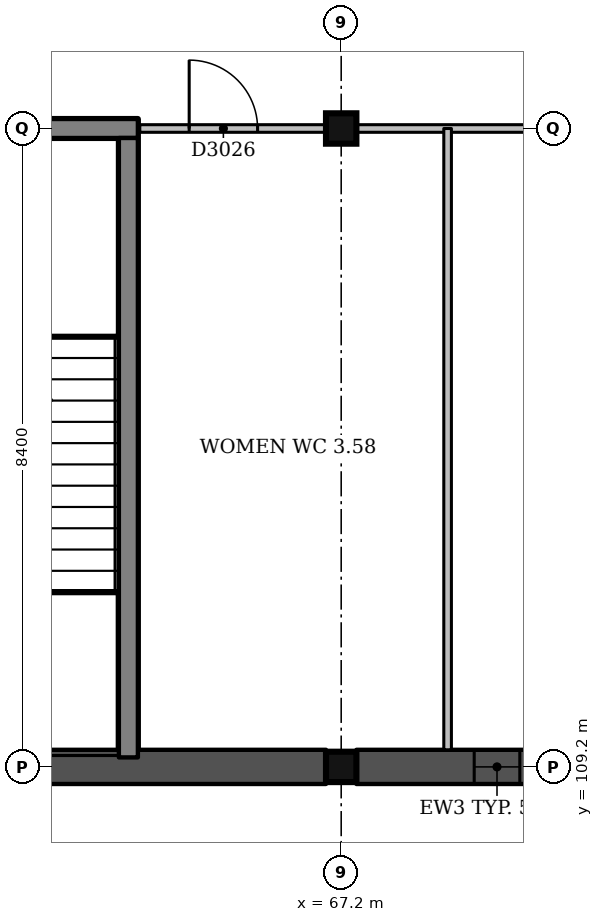
"""IFC4 building model, lengths in metres.
Left out: names, types, materials, properties, quantities, classifications, styles, units other than length and angle.
Written with IfcOpenShell. Run it as: python <this file> out.ifc"""

import sys

from ifc_helpers import new_model, si_unit, direction, frame, frame_2d, origin, origin_2d, place, context, subcontext, project, spatial, rectangle, extrude, element, fill, save


model = new_model("IFC4")
c1 = context("Model", 3, precision=1e-05, world=origin(), true_north=direction((0.0, 1.0)))
c2 = subcontext(c1, "Body", "Model", "MODEL_VIEW")
j1 = project(units=[si_unit("LENGTHUNIT", "METRE"), si_unit("PLANEANGLEUNIT", "RADIAN")], contexts=[c1])
p1 = place(None, origin())
s1 = spatial("IfcSite", under=j1, at=p1, CompositionType="ELEMENT")
p2 = place(p1, origin())
s2 = spatial("IfcBuilding", under=s1, at=p2, CompositionType="ELEMENT")
p3 = place(p2, frame((0.0, 0.0, 13.5)))
s3 = spatial("IfcBuildingStorey", under=s2, at=p3, CompositionType="ELEMENT", Elevation=13.5)
for number, where, z_axis, x_axis in (
    (1, (67.2, 109.2, 0.0), (0.0, 0.0, 1.0), (1.0, 0.0, 0.0)),
    (2, (67.2, 117.6, 0.0), (0.0, 0.0, 1.0), (1.0, 0.0, 0.0)),
):
    element("IfcColumn", number, at=place(p3, frame(where, z_axis=z_axis, x_axis=x_axis)), inside=s3, PredefinedType="COLUMN", context=c2, shape_type="SweptSolid", body=[
        extrude(rectangle(XDim=0.4, YDim=0.4, at=origin_2d()), origin(), (0.0, 0.0, 1.0), 4.5),
    ])
p4 = place(p3, frame((59.025, 117.6, 0.0), z_axis=(0.0, 0.0, 1.0), x_axis=(1.0, 0.0, 0.0)))
e3 = element("IfcWall", 3, at=p4, inside=s3, PredefinedType="SHEAR", context=c2, shape_type="SweptSolid", body=[
    extrude(rectangle(XDim=5.5, YDim=0.25, at=frame_2d((2.75, 0.0))), origin(), (0.0, 0.0, 1.0), 4.5),
])
p5 = place(p3, frame((64.4, 109.325, 0.0), z_axis=(0.0, 0.0, 1.0), x_axis=(0.0, 1.0, 0.0)))
e4 = element("IfcWall", 4, at=p5, inside=s3, PredefinedType="SHEAR", context=c2, shape_type="SweptSolid", body=[
    extrude(rectangle(XDim=8.15, YDim=0.25, at=frame_2d((4.075, 0.0))), origin(), (0.0, 0.0, 1.0), 4.5),
])
p6 = place(p3, frame((63.3, 109.2, 0.0), z_axis=(0.0, 0.0, 1.0), x_axis=(1.0, 0.0, 0.0)))
e5 = element("IfcWall", 5, at=p6, inside=s3, PredefinedType="SOLIDWALL", context=c2, shape_type="SweptSolid", body=[
    extrude(rectangle(XDim=3.7, YDim=0.45, at=frame_2d((1.85, 0.0))), origin(), (0.0, 0.0, 1.0), 3.45),
])
p7 = place(p3, frame((67.4, 109.2, 0.0), z_axis=(0.0, 0.0, 1.0), x_axis=(1.0, 0.0, 0.0)))
e6 = element("IfcWall", 6, at=p7, inside=s3, PredefinedType="SOLIDWALL", context=c2, shape_type="SweptSolid", body=[
    extrude(rectangle(XDim=3.7, YDim=0.45, at=frame_2d((1.85, 0.0))), origin(), (0.0, 0.0, 1.0), 3.45),
])
p8 = place(p7, frame((1.55, 0.0, 1.5)))
e7 = element("IfcOpeningElement", 7, at=p8, cuts=e6, PredefinedType="OPENING", context=c2, shape_type="SweptSolid", body=[
    extrude(rectangle(XDim=0.6, YDim=1.2, at=frame_2d((0.3, 0.6))), frame((0.0, 0.235, 0.0), z_axis=(0.0, -1.0, 0.0), x_axis=(1.0, 0.0, 0.0)), (0.0, 0.0, 1.0), 0.47),
])
p9 = place(p3, frame((64.55, 117.6, 0.0), z_axis=(0.0, 0.0, 1.0), x_axis=(1.0, 0.0, 0.0)))
e8 = element("IfcWall", 8, at=p9, inside=s3, PredefinedType="PARTITIONING", context=c2, shape_type="SweptSolid", body=[
    extrude(rectangle(XDim=2.45, YDim=0.1, at=frame_2d((1.225, 0.0))), origin(), (0.0, 0.0, 1.0), 3.6),
])
p10 = place(p9, frame((0.65, 0.0, 0.0)))
e9 = element("IfcOpeningElement", 9, at=p10, cuts=e8, PredefinedType="OPENING", context=c2, shape_type="SweptSolid", body=[
    extrude(rectangle(XDim=0.9, YDim=2.1, at=frame_2d((0.45, 1.05))), frame((0.0, 0.06, 0.0), z_axis=(0.0, -1.0, 0.0), x_axis=(1.0, 0.0, 0.0)), (0.0, 0.0, 1.0), 0.12),
])
p11 = place(p3, frame((67.4, 117.6, 0.0), z_axis=(0.0, 0.0, 1.0), x_axis=(1.0, 0.0, 0.0)))
e10 = element("IfcWall", 10, at=p11, inside=s3, PredefinedType="PARTITIONING", context=c2, shape_type="SweptSolid", body=[
    extrude(rectangle(XDim=8.0, YDim=0.1, at=frame_2d((4.0, 0.0))), origin(), (0.0, 0.0, 1.0), 3.4),
])
p12 = place(p11, frame((2.9, 0.0, 0.0)))
e11 = element("IfcOpeningElement", 11, at=p12, cuts=e10, PredefinedType="OPENING", context=c2, shape_type="SweptSolid", body=[
    extrude(rectangle(XDim=0.9, YDim=2.1, at=frame_2d((0.45, 1.05))), frame((0.0, 0.06, 0.0), z_axis=(0.0, -1.0, 0.0), x_axis=(1.0, 0.0, 0.0)), (0.0, 0.0, 1.0), 0.12),
])
p13 = place(p3, frame((68.6, 109.425, 0.0), z_axis=(0.0, 0.0, 1.0), x_axis=(0.0, 1.0, 0.0)))
e12 = element("IfcWall", 12, at=p13, inside=s3, PredefinedType="PARTITIONING", context=c2, shape_type="SweptSolid", body=[
    extrude(rectangle(XDim=8.175, YDim=0.1, at=frame_2d((4.087, 0.0))), origin(), (0.0, 0.0, 1.0), 3.5),
])
p14 = place(p8, origin())
e13 = element("IfcWindow", 13, at=p14, inside=s3, PartitioningType="SINGLE_PANEL", PredefinedType="WINDOW", context=c2, shape_type="SweptSolid", body=[
    extrude(rectangle(XDim=0.6, YDim=1.2, at=frame_2d((0.3, 0.6))), frame((0.0, 0.135, 0.0), z_axis=(0.0, -1.0, 0.0), x_axis=(1.0, 0.0, 0.0)), (0.0, 0.0, 1.0), 0.06),
])
fill(e7, e13)
p15 = place(p10, origin())
e14 = element("IfcDoor", 14, at=p15, inside=s3, OperationType="SINGLE_SWING_LEFT", PredefinedType="DOOR", context=c2, shape_type="SweptSolid", body=[
    extrude(rectangle(XDim=0.9, YDim=2.1, at=frame_2d((0.45, 1.05))), frame((0.0, 0.025, 0.0), z_axis=(0.0, -1.0, 0.0), x_axis=(1.0, 0.0, 0.0)), (0.0, 0.0, 1.0), 0.05),
])
fill(e9, e14)
save(model, sys.argv[1])
